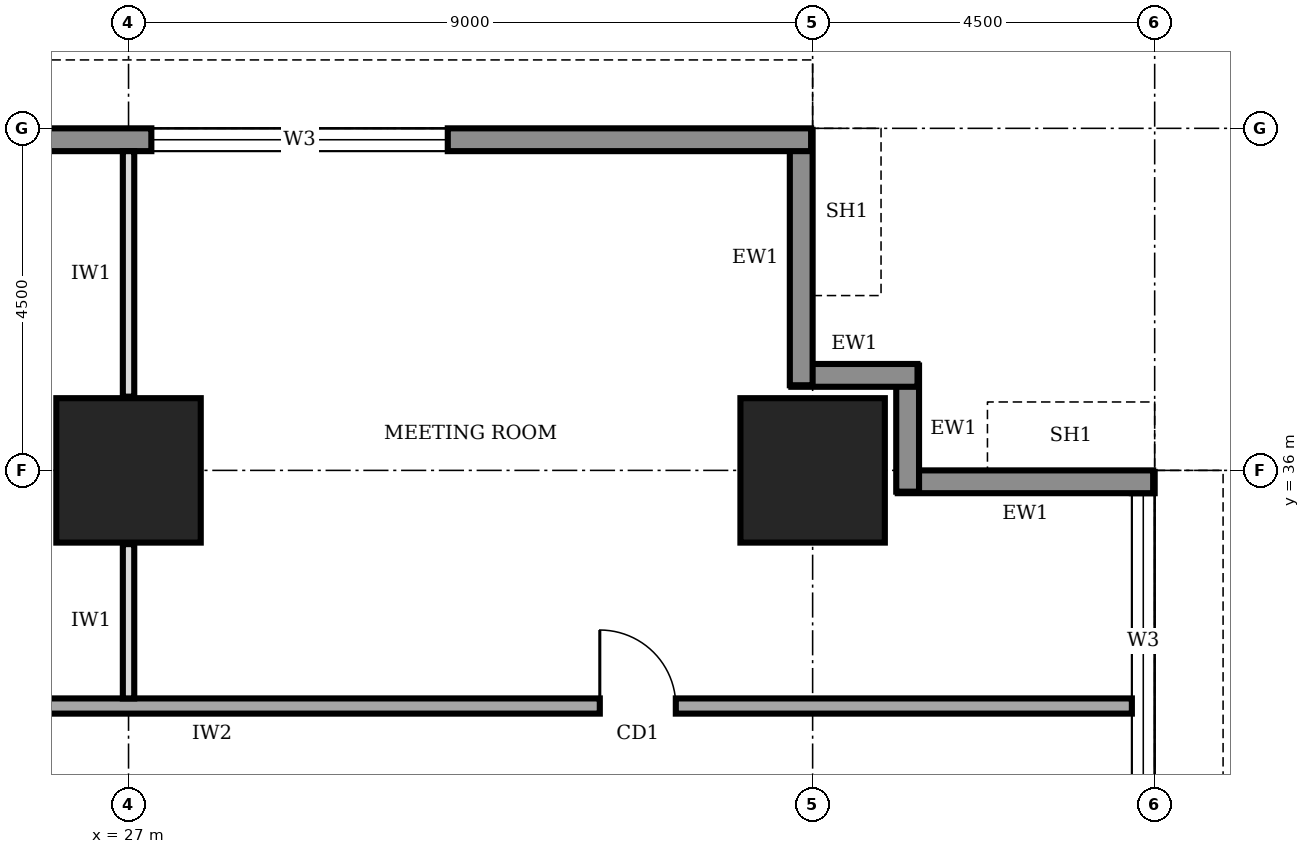
"""IFC4 building model, lengths in metres.
Left out: names, types, materials, properties, quantities, classifications, styles, units other than length and angle.
Written with IfcOpenShell. Run it as: python <this file> out.ifc"""

import sys

from ifc_helpers import new_model, si_unit, direction, frame, frame_2d, origin, origin_2d, place, context, subcontext, project, spatial, rectangle, extrude, element, fill, save


model = new_model("IFC4")
c1 = context("Model", 3, precision=1e-05, world=origin(), true_north=direction((0.0, 1.0)))
c2 = subcontext(c1, "Body", "Model", "MODEL_VIEW")
j1 = project(units=[si_unit("LENGTHUNIT", "METRE"), si_unit("PLANEANGLEUNIT", "RADIAN")], contexts=[c1])
p1 = place(None, origin())
s1 = spatial("IfcSite", under=j1, at=p1, CompositionType="ELEMENT")
p2 = place(p1, origin())
s2 = spatial("IfcBuilding", under=s1, at=p2, CompositionType="ELEMENT")
p3 = place(p2, frame((0.0, 0.0, 89.0)))
s3 = spatial("IfcBuildingStorey", under=s2, at=p3, CompositionType="ELEMENT", Elevation=89.0)
for number, where, z_axis, x_axis in (
    (1, (27.0, 36.0, 0.0), (0.0, 0.0, 1.0), (1.0, 0.0, 0.0)),
    (2, (36.0, 36.0, 0.0), (0.0, 0.0, 1.0), (1.0, 0.0, 0.0)),
):
    element("IfcColumn", number, at=place(p3, frame(where, z_axis=z_axis, x_axis=x_axis)), inside=s3, PredefinedType="COLUMN", context=c2, shape_type="SweptSolid", body=[
        extrude(rectangle(XDim=1.9, YDim=1.9, at=origin_2d()), origin(), (0.0, 0.0, 1.0), 4.0),
    ])
p4 = place(p3, frame((40.35, 4.52, 0.0), z_axis=(0.0, 0.0, 1.0), x_axis=(0.0, 1.0, 0.0)))
e3 = element("IfcWall", 3, at=p4, inside=s3, PredefinedType="STANDARD", context=c2, shape_type="SweptSolid", body=[
    extrude(rectangle(XDim=31.46, YDim=0.3, at=frame_2d((15.73, 0.0))), origin(), (0.0, 0.0, 1.0), 3.75),
])
p5 = place(p4, frame((4.78, 0.0, 0.95)))
e4 = element("IfcOpeningElement", 4, at=p5, cuts=e3, PredefinedType="OPENING", context=c2, shape_type="SweptSolid", body=[
    extrude(rectangle(XDim=3.9, YDim=1.8, at=frame_2d((1.95, 0.9))), frame((0.0, 0.16, 0.0), z_axis=(0.0, -1.0, 0.0), x_axis=(1.0, 0.0, 0.0)), (0.0, 0.0, 1.0), 0.32),
])
p6 = place(p4, frame((9.28, 0.0, 0.95)))
e5 = element("IfcOpeningElement", 5, at=p6, cuts=e3, PredefinedType="OPENING", context=c2, shape_type="SweptSolid", body=[
    extrude(rectangle(XDim=3.9, YDim=1.8, at=frame_2d((1.95, 0.9))), frame((0.0, 0.16, 0.0), z_axis=(0.0, -1.0, 0.0), x_axis=(1.0, 0.0, 0.0)), (0.0, 0.0, 1.0), 0.32),
])
p7 = place(p4, frame((13.78, 0.0, 0.95)))
e6 = element("IfcOpeningElement", 6, at=p7, cuts=e3, PredefinedType="OPENING", context=c2, shape_type="SweptSolid", body=[
    extrude(rectangle(XDim=3.9, YDim=1.8, at=frame_2d((1.95, 0.9))), frame((0.0, 0.16, 0.0), z_axis=(0.0, -1.0, 0.0), x_axis=(1.0, 0.0, 0.0)), (0.0, 0.0, 1.0), 0.32),
])
p8 = place(p4, frame((18.28, 0.0, 0.95)))
e7 = element("IfcOpeningElement", 7, at=p8, cuts=e3, PredefinedType="OPENING", context=c2, shape_type="SweptSolid", body=[
    extrude(rectangle(XDim=3.9, YDim=1.8, at=frame_2d((1.95, 0.9))), frame((0.0, 0.16, 0.0), z_axis=(0.0, -1.0, 0.0), x_axis=(1.0, 0.0, 0.0)), (0.0, 0.0, 1.0), 0.32),
])
p9 = place(p4, frame((22.78, 0.0, 0.95)))
e8 = element("IfcOpeningElement", 8, at=p9, cuts=e3, PredefinedType="OPENING", context=c2, shape_type="SweptSolid", body=[
    extrude(rectangle(XDim=3.9, YDim=1.8, at=frame_2d((1.95, 0.9))), frame((0.0, 0.16, 0.0), z_axis=(0.0, -1.0, 0.0), x_axis=(1.0, 0.0, 0.0)), (0.0, 0.0, 1.0), 0.32),
])
p10 = place(p4, frame((27.28, 0.0, 0.95)))
e9 = element("IfcOpeningElement", 9, at=p10, cuts=e3, PredefinedType="OPENING", context=c2, shape_type="SweptSolid", body=[
    extrude(rectangle(XDim=3.9, YDim=1.8, at=frame_2d((1.95, 0.9))), frame((0.0, 0.16, 0.0), z_axis=(0.0, -1.0, 0.0), x_axis=(1.0, 0.0, 0.0)), (0.0, 0.0, 1.0), 0.32),
])
p11 = place(p3, frame((40.48, 35.85, 0.0), z_axis=(0.0, 0.0, 1.0), x_axis=(-1.0, 0.0, 0.0)))
e10 = element("IfcWall", 10, at=p11, inside=s3, PredefinedType="STANDARD", context=c2, shape_type="SweptSolid", body=[
    extrude(rectangle(XDim=3.36, YDim=0.3, at=frame_2d((1.68, 0.0))), origin(), (0.0, 0.0, 1.0), 2.85),
])
for number, where, z_axis, x_axis in (
    (11, (37.25, 35.72, 0.0), (0.0, 0.0, 1.0), (0.0, 1.0, 0.0)),
    (12, (37.38, 37.25, 0.0), (0.0, 0.0, 1.0), (-1.0, 0.0, 0.0)),
):
    element("IfcWall", number, at=place(p3, frame(where, z_axis=z_axis, x_axis=x_axis)), inside=s3, PredefinedType="STANDARD", context=c2, shape_type="SweptSolid", body=[
        extrude(rectangle(XDim=1.66, YDim=0.3, at=frame_2d((0.83, 0.0))), origin(), (0.0, 0.0, 1.0), 3.75),
    ])
p12 = place(p3, frame((35.85, 37.12, 0.0), z_axis=(0.0, 0.0, 1.0), x_axis=(0.0, 1.0, 0.0)))
e13 = element("IfcWall", 13, at=p12, inside=s3, PredefinedType="STANDARD", context=c2, shape_type="SweptSolid", body=[
    extrude(rectangle(XDim=3.36, YDim=0.3, at=frame_2d((1.68, 0.0))), origin(), (0.0, 0.0, 1.0), 2.85),
])
p13 = place(p3, frame((35.98, 40.35, 0.0), z_axis=(0.0, 0.0, 1.0), x_axis=(-1.0, 0.0, 0.0)))
e14 = element("IfcWall", 14, at=p13, inside=s3, PredefinedType="STANDARD", context=c2, shape_type="SweptSolid", body=[
    extrude(rectangle(XDim=31.46, YDim=0.3, at=frame_2d((15.73, 0.0))), origin(), (0.0, 0.0, 1.0), 3.75),
])
p14 = place(p13, frame((27.28, 0.0, 0.95)))
e15 = element("IfcOpeningElement", 15, at=p14, cuts=e14, PredefinedType="OPENING", context=c2, shape_type="SweptSolid", body=[
    extrude(rectangle(XDim=3.9, YDim=1.8, at=frame_2d((1.95, 0.9))), frame((0.0, 0.16, 0.0), z_axis=(0.0, -1.0, 0.0), x_axis=(1.0, 0.0, 0.0)), (0.0, 0.0, 1.0), 0.32),
])
p15 = place(p13, frame((22.78, 0.0, 0.95)))
e16 = element("IfcOpeningElement", 16, at=p15, cuts=e14, PredefinedType="OPENING", context=c2, shape_type="SweptSolid", body=[
    extrude(rectangle(XDim=3.9, YDim=1.8, at=frame_2d((1.95, 0.9))), frame((0.0, 0.16, 0.0), z_axis=(0.0, -1.0, 0.0), x_axis=(1.0, 0.0, 0.0)), (0.0, 0.0, 1.0), 0.32),
])
p16 = place(p13, frame((4.78, 0.0, 0.95)))
e17 = element("IfcOpeningElement", 17, at=p16, cuts=e14, PredefinedType="OPENING", context=c2, shape_type="SweptSolid", body=[
    extrude(rectangle(XDim=3.9, YDim=1.8, at=frame_2d((1.95, 0.9))), frame((0.0, 0.16, 0.0), z_axis=(0.0, -1.0, 0.0), x_axis=(1.0, 0.0, 0.0)), (0.0, 0.0, 1.0), 0.32),
])
p17 = place(p3, frame((40.2, 32.9, 0.0), z_axis=(0.0, 0.0, 1.0), x_axis=(-1.0, 0.0, 0.0)))
e18 = element("IfcWall", 18, at=p17, inside=s3, PredefinedType="SOLIDWALL", context=c2, shape_type="SweptSolid", body=[
    extrude(rectangle(XDim=28.5, YDim=0.2, at=frame_2d((14.25, 0.0))), origin(), (0.0, 0.0, 1.0), 3.75),
])
p18 = place(p17, frame((27.2, 0.0, 0.0)))
e19 = element("IfcOpeningElement", 19, at=p18, cuts=e18, PredefinedType="OPENING", context=c2, shape_type="SweptSolid", body=[
    extrude(rectangle(XDim=1.0, YDim=2.1, at=frame_2d((0.5, 1.05))), frame((0.0, 0.11, 0.0), z_axis=(0.0, -1.0, 0.0), x_axis=(1.0, 0.0, 0.0)), (0.0, 0.0, 1.0), 0.22),
])
p19 = place(p17, frame((23.95, 0.0, 0.0)))
e20 = element("IfcOpeningElement", 20, at=p19, cuts=e18, PredefinedType="OPENING", context=c2, shape_type="SweptSolid", body=[
    extrude(rectangle(XDim=1.0, YDim=2.1, at=frame_2d((0.5, 1.05))), frame((0.0, 0.11, 0.0), z_axis=(0.0, -1.0, 0.0), x_axis=(1.0, 0.0, 0.0)), (0.0, 0.0, 1.0), 0.22),
])
p20 = place(p17, frame((17.2, 0.0, 0.0)))
e21 = element("IfcOpeningElement", 21, at=p20, cuts=e18, PredefinedType="OPENING", context=c2, shape_type="SweptSolid", body=[
    extrude(rectangle(XDim=1.0, YDim=2.1, at=frame_2d((0.5, 1.05))), frame((0.0, 0.11, 0.0), z_axis=(0.0, -1.0, 0.0), x_axis=(1.0, 0.0, 0.0)), (0.0, 0.0, 1.0), 0.22),
])
p21 = place(p17, frame((6.0, 0.0, 0.0)))
e22 = element("IfcOpeningElement", 22, at=p21, cuts=e18, PredefinedType="OPENING", context=c2, shape_type="SweptSolid", body=[
    extrude(rectangle(XDim=1.0, YDim=2.1, at=frame_2d((0.5, 1.05))), frame((0.0, 0.11, 0.0), z_axis=(0.0, -1.0, 0.0), x_axis=(1.0, 0.0, 0.0)), (0.0, 0.0, 1.0), 0.22),
])
p22 = place(p3, frame((27.0, 33.0, 0.0), z_axis=(0.0, 0.0, 1.0), x_axis=(0.0, 1.0, 0.0)))
e23 = element("IfcWall", 23, at=p22, inside=s3, PredefinedType="PARTITIONING", context=c2, shape_type="SweptSolid", body=[
    extrude(rectangle(XDim=2.03, YDim=0.15, at=frame_2d((1.015, 0.0))), origin(), (0.0, 0.0, 1.0), 2.85),
])
p23 = place(p3, frame((27.0, 36.97, 0.0), z_axis=(0.0, 0.0, 1.0), x_axis=(0.0, 1.0, 0.0)))
e24 = element("IfcWall", 24, at=p23, inside=s3, PredefinedType="PARTITIONING", context=c2, shape_type="SweptSolid", body=[
    extrude(rectangle(XDim=3.23, YDim=0.15, at=frame_2d((1.615, 0.0))), origin(), (0.0, 0.0, 1.0), 2.85),
])
p24 = place(p10, origin())
e25 = element("IfcWindow", 25, at=p24, inside=s3, PartitioningType="SINGLE_PANEL", PredefinedType="WINDOW", context=c2, shape_type="SweptSolid", body=[
    extrude(rectangle(XDim=3.9, YDim=1.8, at=frame_2d((1.95, 0.9))), frame((0.0, 0.03, 0.0), z_axis=(0.0, -1.0, 0.0), x_axis=(1.0, 0.0, 0.0)), (0.0, 0.0, 1.0), 0.06),
])
fill(e9, e25)
p25 = place(p16, origin())
e26 = element("IfcWindow", 26, at=p25, inside=s3, PartitioningType="SINGLE_PANEL", PredefinedType="WINDOW", context=c2, shape_type="SweptSolid", body=[
    extrude(rectangle(XDim=3.9, YDim=1.8, at=frame_2d((1.95, 0.9))), frame((0.0, 0.03, 0.0), z_axis=(0.0, -1.0, 0.0), x_axis=(1.0, 0.0, 0.0)), (0.0, 0.0, 1.0), 0.06),
])
fill(e17, e26)
p26 = place(p21, frame((1.0, 0.0, 0.0), z_axis=(0.0, 0.0, 1.0), x_axis=(-1.0, 0.0, 0.0)))
e27 = element("IfcDoor", 27, at=p26, inside=s3, OperationType="SINGLE_SWING_LEFT", PredefinedType="DOOR", context=c2, shape_type="SweptSolid", body=[
    extrude(rectangle(XDim=1.0, YDim=2.1, at=frame_2d((0.5, 1.05))), frame((0.0, 0.025, 0.0), z_axis=(0.0, -1.0, 0.0), x_axis=(1.0, 0.0, 0.0)), (0.0, 0.0, 1.0), 0.05),
])
fill(e22, e27)
save(model, sys.argv[1])
